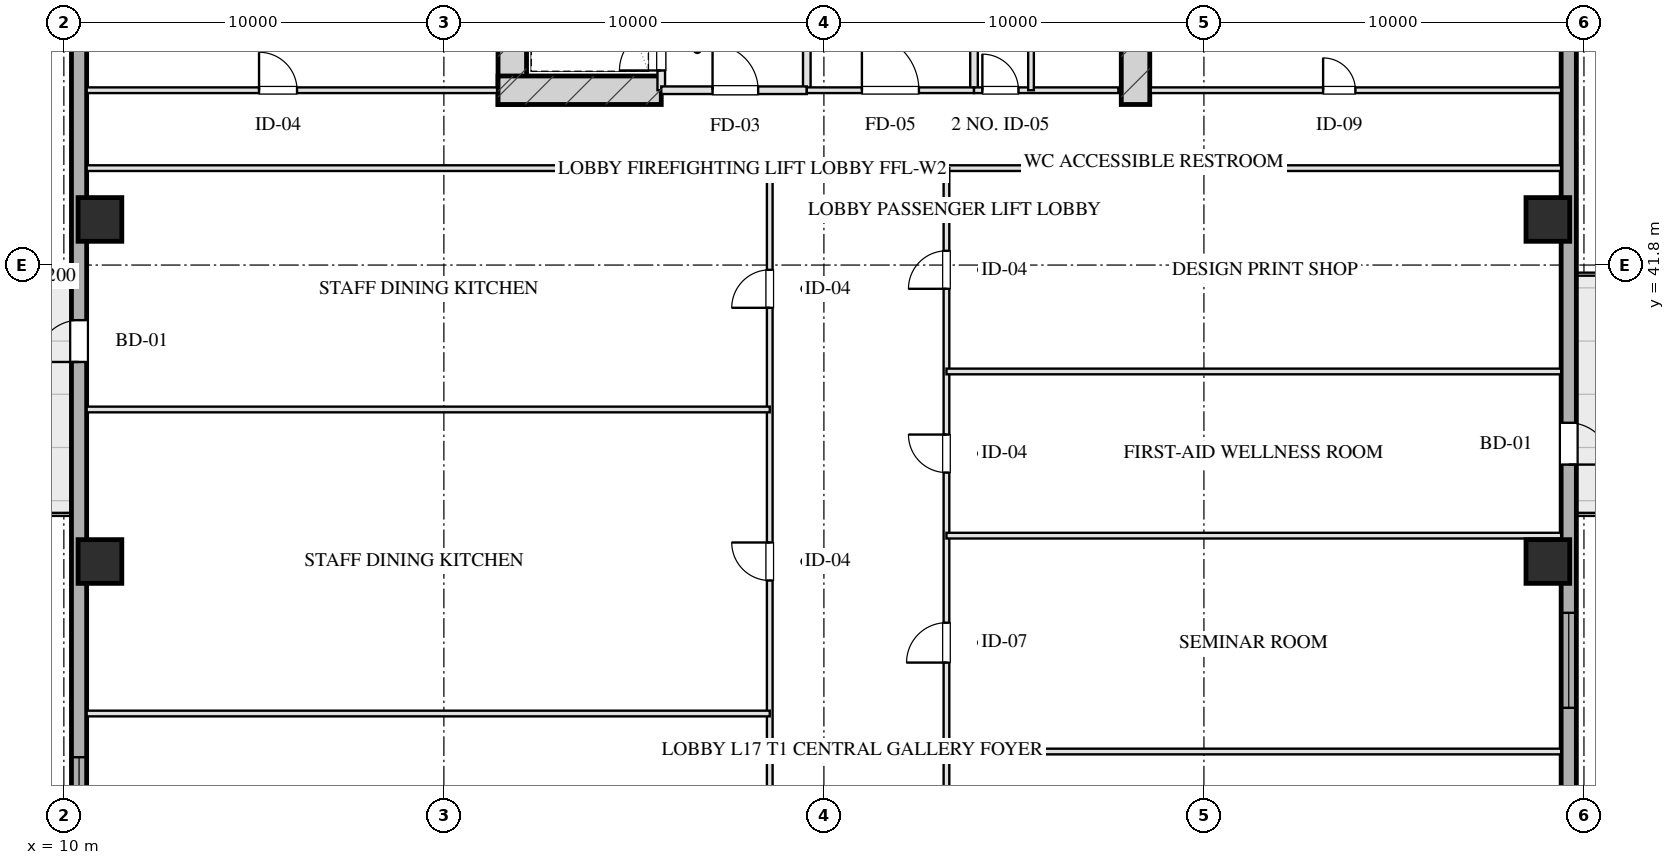
"""IFC4 building model, lengths in metres.
Left out: names, types, materials, properties, quantities, classifications, styles, units other than length and angle.
Written with IfcOpenShell. Run it as: python <this file> out.ifc"""

import sys

from ifc_helpers import new_model, si_unit, direction, frame, frame_2d, origin, origin_2d, place, context, subcontext, project, spatial, rectangle, hollow_rectangle, extrude, element, fill, save


model = new_model("IFC4")
c1 = context("Model", 3, precision=1e-05, world=origin(), true_north=direction((0.0, 1.0)))
c2 = subcontext(c1, "Body", "Model", "MODEL_VIEW")
j1 = project(units=[si_unit("LENGTHUNIT", "METRE"), si_unit("PLANEANGLEUNIT", "RADIAN")], contexts=[c1])
p1 = place(None, origin())
s1 = spatial("IfcSite", under=j1, at=p1, CompositionType="ELEMENT")
p2 = place(p1, origin())
s2 = spatial("IfcBuilding", under=s1, at=p2, CompositionType="ELEMENT")
p3 = place(p2, frame((0.0, 0.0, 71.3)))
s3 = spatial("IfcBuildingStorey", under=s2, at=p3, CompositionType="ELEMENT", Elevation=71.3)
for number, where, z_axis, x_axis in (
    (1, (21.8, 46.025, 0.0), (0.0, 0.0, 1.0), (0.0, 1.0, 0.0)),
    (2, (38.2, 46.025, 0.0), (0.0, 0.0, 1.0), (0.0, 1.0, 0.0)),
):
    element("IfcWall", number, at=place(p3, frame(where, z_axis=z_axis, x_axis=x_axis)), inside=s3, PredefinedType="SHEAR", context=c2, shape_type="SweptSolid", body=[
        extrude(rectangle(XDim=9.63, YDim=0.75, at=frame_2d((4.815, 0.0))), origin(), (0.0, 0.0, 1.0), 3.45),
    ])
p4 = place(p3, frame((21.425, 46.4, 0.0), z_axis=(0.0, 0.0, 1.0), x_axis=(1.0, 0.0, 0.0)))
e3 = element("IfcWall", 3, at=p4, inside=s3, PredefinedType="SHEAR", context=c2, shape_type="SweptSolid", body=[
    extrude(rectangle(XDim=4.295, YDim=0.75, at=frame_2d((2.147, 0.0))), origin(), (0.0, 0.0, 1.0), 3.45),
])
for number, where, z_axis, x_axis in (
    (4, (10.95, 34.0, 0.0), (0.0, 0.0, 1.0), (1.0, 0.0, 0.0)),
    (5, (10.95, 43.0, 0.0), (0.0, 0.0, 1.0), (1.0, 0.0, 0.0)),
    (6, (49.05, 34.0, 0.0), (0.0, 0.0, 1.0), (1.0, 0.0, 0.0)),
    (7, (49.05, 43.0, 0.0), (0.0, 0.0, 1.0), (1.0, 0.0, 0.0)),
):
    element("IfcColumn", number, at=place(p3, frame(where, z_axis=z_axis, x_axis=x_axis)), inside=s3, PredefinedType="COLUMN", context=c2, shape_type="SweptSolid", body=[
        extrude(hollow_rectangle(XDim=1.15, YDim=1.15, WallThickness=0.04, at=origin_2d()), origin(), (0.0, 0.0, 1.0), 3.451),
    ])
p5 = place(p3, frame((10.4, 7.2, 0.0), z_axis=(0.0, 0.0, 1.0), x_axis=(0.0, 1.0, 0.0)))
e8 = element("IfcWall", 8, at=p5, inside=s3, PredefinedType="SOLIDWALL", context=c2, shape_type="SweptSolid", body=[
    extrude(rectangle(XDim=53.6, YDim=0.4, at=frame_2d((26.8, 0.0))), origin(), (0.0, 0.0, 1.0), 2.61),
])
p6 = place(p5, frame((19.15, 0.0, 0.75)))
e9 = element("IfcOpeningElement", 9, at=p6, cuts=e8, PredefinedType="OPENING", context=c2, shape_type="SweptSolid", body=[
    extrude(rectangle(XDim=2.5, YDim=1.46, at=frame_2d((1.25, 0.73))), frame((0.0, 0.21, 0.0), z_axis=(0.0, -1.0, 0.0), x_axis=(1.0, 0.0, 0.0)), (0.0, 0.0, 1.0), 0.42),
])
p7 = place(p5, frame((32.05, 0.0, 0.0)))
e10 = element("IfcOpeningElement", 10, at=p7, cuts=e8, PredefinedType="OPENING", context=c2, shape_type="SweptSolid", body=[
    extrude(rectangle(XDim=1.1, YDim=2.15, at=frame_2d((0.55, 1.075))), frame((0.0, 0.21, 0.0), z_axis=(0.0, -1.0, 0.0), x_axis=(1.0, 0.0, 0.0)), (0.0, 0.0, 1.0), 0.42),
])
p8 = place(p3, frame((49.6, 60.8, 0.0), z_axis=(0.0, 0.0, 1.0), x_axis=(0.0, -1.0, 0.0)))
e11 = element("IfcWall", 11, at=p8, inside=s3, PredefinedType="SOLIDWALL", context=c2, shape_type="SweptSolid", body=[
    extrude(rectangle(XDim=53.6, YDim=0.4, at=frame_2d((26.8, 0.0))), origin(), (0.0, 0.0, 1.0), 2.61),
])
p9 = place(p8, frame((28.15, 0.0, 0.75)))
e12 = element("IfcOpeningElement", 12, at=p9, cuts=e11, PredefinedType="OPENING", context=c2, shape_type="SweptSolid", body=[
    extrude(rectangle(XDim=2.5, YDim=1.46, at=frame_2d((1.25, 0.73))), frame((0.0, 0.21, 0.0), z_axis=(0.0, -1.0, 0.0), x_axis=(1.0, 0.0, 0.0)), (0.0, 0.0, 1.0), 0.42),
])
p10 = place(p8, frame((23.15, 0.0, 0.0)))
e13 = element("IfcOpeningElement", 13, at=p10, cuts=e11, PredefinedType="OPENING", context=c2, shape_type="SweptSolid", body=[
    extrude(rectangle(XDim=1.1, YDim=2.15, at=frame_2d((0.55, 1.075))), frame((0.0, 0.21, 0.0), z_axis=(0.0, -1.0, 0.0), x_axis=(1.0, 0.0, 0.0)), (0.0, 0.0, 1.0), 0.42),
])
p11 = place(p3, frame((25.72, 46.4, 0.0), z_axis=(0.0, 0.0, 1.0), x_axis=(0.0, 1.0, 0.0)))
e14 = element("IfcWall", 14, at=p11, inside=s3, PredefinedType="PARTITIONING", context=c2, shape_type="SweptSolid", body=[
    extrude(rectangle(XDim=1.9, YDim=0.2, at=frame_2d((0.95, 0.0))), origin(), (0.0, 0.0, 1.0), 3.175),
])
p12 = place(p11, frame((0.52, 0.0, 0.0)))
e15 = element("IfcOpeningElement", 15, at=p12, cuts=e14, PredefinedType="OPENING", context=c2, shape_type="SweptSolid", body=[
    extrude(rectangle(XDim=1.1, YDim=2.05, at=frame_2d((0.55, 1.025))), frame((0.0, 0.11, 0.0), z_axis=(0.0, -1.0, 0.0), x_axis=(1.0, 0.0, 0.0)), (0.0, 0.0, 1.0), 0.22),
])
p13 = place(p3, frame((29.55, 46.4, 0.0), z_axis=(0.0, 0.0, 1.0), x_axis=(0.0, 1.0, 0.0)))
e16 = element("IfcWall", 16, at=p13, inside=s3, PredefinedType="PARTITIONING", context=c2, shape_type="SweptSolid", body=[
    extrude(rectangle(XDim=8.43, YDim=0.2, at=frame_2d((4.215, 0.0))), origin(), (0.0, 0.0, 1.0), 3.175),
])
p14 = place(p3, frame((25.72, 46.4, 0.0), z_axis=(0.0, 0.0, 1.0), x_axis=(1.0, 0.0, 0.0)))
e17 = element("IfcWall", 17, at=p14, inside=s3, PredefinedType="PARTITIONING", context=c2, shape_type="SweptSolid", body=[
    extrude(rectangle(XDim=3.83, YDim=0.2, at=frame_2d((1.915, 0.0))), origin(), (0.0, 0.0, 1.0), 3.175),
])
p15 = place(p14, frame((1.35, 0.0, 0.0)))
e18 = element("IfcOpeningElement", 18, at=p15, cuts=e17, PredefinedType="OPENING", context=c2, shape_type="SweptSolid", body=[
    extrude(rectangle(XDim=1.2, YDim=2.05, at=frame_2d((0.6, 1.025))), frame((0.0, 0.11, 0.0), z_axis=(0.0, -1.0, 0.0), x_axis=(1.0, 0.0, 0.0)), (0.0, 0.0, 1.0), 0.22),
])
p16 = place(p3, frame((33.95, 46.4, 0.0), z_axis=(0.0, 0.0, 1.0), x_axis=(0.0, 1.0, 0.0)))
e19 = element("IfcWall", 19, at=p16, inside=s3, PredefinedType="PARTITIONING", context=c2, shape_type="SweptSolid", body=[
    extrude(rectangle(XDim=8.43, YDim=0.2, at=frame_2d((4.215, 0.0))), origin(), (0.0, 0.0, 1.0), 3.175),
])
p17 = place(p3, frame((29.55, 46.4, 0.0), z_axis=(0.0, 0.0, 1.0), x_axis=(1.0, 0.0, 0.0)))
e20 = element("IfcWall", 20, at=p17, inside=s3, PredefinedType="PARTITIONING", context=c2, shape_type="SweptSolid", body=[
    extrude(rectangle(XDim=4.4, YDim=0.15, at=frame_2d((2.2, 0.0))), origin(), (0.0, 0.0, 1.0), 3.175),
])
p18 = place(p17, frame((1.45, 0.0, 0.0)))
e21 = element("IfcOpeningElement", 21, at=p18, cuts=e20, PredefinedType="OPENING", context=c2, shape_type="SweptSolid", body=[
    extrude(rectangle(XDim=1.5, YDim=2.05, at=frame_2d((0.75, 1.025))), frame((0.0, 0.085, 0.0), z_axis=(0.0, -1.0, 0.0), x_axis=(1.0, 0.0, 0.0)), (0.0, 0.0, 1.0), 0.17),
])
p19 = place(p3, frame((33.95, 46.4, 0.0), z_axis=(0.0, 0.0, 1.0), x_axis=(1.0, 0.0, 0.0)))
e22 = element("IfcWall", 22, at=p19, inside=s3, PredefinedType="PARTITIONING", context=c2, shape_type="SweptSolid", body=[
    extrude(rectangle(XDim=3.8, YDim=0.15, at=frame_2d((1.9, 0.0))), origin(), (0.0, 0.0, 1.0), 3.175),
])
p20 = place(p19, frame((0.22, 0.0, 0.0)))
e23 = element("IfcOpeningElement", 23, at=p20, cuts=e22, PredefinedType="OPENING", context=c2, shape_type="SweptSolid", body=[
    extrude(rectangle(XDim=0.95, YDim=2.05, at=frame_2d((0.475, 1.025))), frame((0.0, 0.085, 0.0), z_axis=(0.0, -1.0, 0.0), x_axis=(1.0, 0.0, 0.0)), (0.0, 0.0, 1.0), 0.17),
])
p21 = place(p3, frame((35.45, 46.4, 0.0), z_axis=(0.0, 0.0, 1.0), x_axis=(0.0, 1.0, 0.0)))
e24 = element("IfcWall", 24, at=p21, inside=s3, PredefinedType="PARTITIONING", context=c2, shape_type="SweptSolid", body=[
    extrude(rectangle(XDim=8.43, YDim=0.15, at=frame_2d((4.215, 0.0))), origin(), (0.0, 0.0, 1.0), 2.815),
])
p22 = place(p21, frame((2.55, 0.0, 0.0)))
e25 = element("IfcOpeningElement", 25, at=p22, cuts=e24, PredefinedType="OPENING", context=c2, shape_type="SweptSolid", body=[
    extrude(rectangle(XDim=0.95, YDim=2.05, at=frame_2d((0.475, 1.025))), frame((0.0, 0.085, 0.0), z_axis=(0.0, -1.0, 0.0), x_axis=(1.0, 0.0, 0.0)), (0.0, 0.0, 1.0), 0.17),
])
p23 = place(p21, frame((5.8, 0.0, 0.0)))
e26 = element("IfcOpeningElement", 26, at=p23, cuts=e24, PredefinedType="OPENING", context=c2, shape_type="SweptSolid", body=[
    extrude(rectangle(XDim=0.9, YDim=2.05, at=frame_2d((0.45, 1.025))), frame((0.0, 0.085, 0.0), z_axis=(0.0, -1.0, 0.0), x_axis=(1.0, 0.0, 0.0)), (0.0, 0.0, 1.0), 0.17),
])
p24 = place(p3, frame((10.6, 46.4, 0.0), z_axis=(0.0, 0.0, 1.0), x_axis=(1.0, 0.0, 0.0)))
e27 = element("IfcWall", 27, at=p24, inside=s3, PredefinedType="PARTITIONING", context=c2, shape_type="SweptSolid", body=[
    extrude(rectangle(XDim=10.8, YDim=0.15, at=frame_2d((5.4, 0.0))), origin(), (0.0, 0.0, 1.0), 3.175),
])
p25 = place(p24, frame((4.536, 0.0, 0.0)))
e28 = element("IfcOpeningElement", 28, at=p25, cuts=e27, PredefinedType="OPENING", context=c2, shape_type="SweptSolid", body=[
    extrude(rectangle(XDim=1.0, YDim=2.05, at=frame_2d((0.5, 1.025))), frame((0.0, 0.085, 0.0), z_axis=(0.0, -1.0, 0.0), x_axis=(1.0, 0.0, 0.0)), (0.0, 0.0, 1.0), 0.17),
])
p26 = place(p3, frame((38.6, 46.4, 0.0), z_axis=(0.0, 0.0, 1.0), x_axis=(1.0, 0.0, 0.0)))
e29 = element("IfcWall", 29, at=p26, inside=s3, PredefinedType="PARTITIONING", context=c2, shape_type="SweptSolid", body=[
    extrude(rectangle(XDim=10.8, YDim=0.15, at=frame_2d((5.4, 0.0))), origin(), (0.0, 0.0, 1.0), 3.175),
])
p27 = place(p26, frame((4.536, 0.0, 0.0)))
e30 = element("IfcOpeningElement", 30, at=p27, cuts=e29, PredefinedType="OPENING", context=c2, shape_type="SweptSolid", body=[
    extrude(rectangle(XDim=0.85, YDim=2.05, at=frame_2d((0.425, 1.025))), frame((0.0, 0.085, 0.0), z_axis=(0.0, -1.0, 0.0), x_axis=(1.0, 0.0, 0.0)), (0.0, 0.0, 1.0), 0.17),
])
p28 = place(p3, frame((10.6, 44.35, 0.0), z_axis=(0.0, 0.0, 1.0), x_axis=(1.0, 0.0, 0.0)))
e31 = element("IfcWall", 31, at=p28, inside=s3, PredefinedType="PARTITIONING", context=c2, shape_type="SweptSolid", body=[
    extrude(rectangle(XDim=17.975, YDim=0.15, at=frame_2d((8.987, 0.0))), origin(), (0.0, 0.0, 1.0), 3.175),
])
p29 = place(p3, frame((33.225, 44.35, 0.0), z_axis=(0.0, 0.0, 1.0), x_axis=(1.0, 0.0, 0.0)))
e32 = element("IfcWall", 32, at=p29, inside=s3, PredefinedType="PARTITIONING", context=c2, shape_type="SweptSolid", body=[
    extrude(rectangle(XDim=16.175, YDim=0.15, at=frame_2d((8.087, 0.0))), origin(), (0.0, 0.0, 1.0), 3.175),
])
p30 = place(p3, frame((28.575, 23.65, 0.0), z_axis=(0.0, 0.0, 1.0), x_axis=(0.0, 1.0, 0.0)))
e33 = element("IfcWall", 33, at=p30, inside=s3, PredefinedType="PARTITIONING", context=c2, shape_type="SweptSolid", body=[
    extrude(rectangle(XDim=20.7, YDim=0.15, at=frame_2d((10.35, 0.0))), origin(), (0.0, 0.0, 1.0), 3.175),
])
p31 = place(p30, frame((2.675, 0.0, 0.0)))
e34 = element("IfcOpeningElement", 34, at=p31, cuts=e33, PredefinedType="OPENING", context=c2, shape_type="SweptSolid", body=[
    extrude(rectangle(XDim=1.0, YDim=2.05, at=frame_2d((0.5, 1.025))), frame((0.0, 0.085, 0.0), z_axis=(0.0, -1.0, 0.0), x_axis=(1.0, 0.0, 0.0)), (0.0, 0.0, 1.0), 0.17),
])
p32 = place(p30, frame((9.85, 0.0, 0.0)))
e35 = element("IfcOpeningElement", 35, at=p32, cuts=e33, PredefinedType="OPENING", context=c2, shape_type="SweptSolid", body=[
    extrude(rectangle(XDim=1.0, YDim=2.05, at=frame_2d((0.5, 1.025))), frame((0.0, 0.085, 0.0), z_axis=(0.0, -1.0, 0.0), x_axis=(1.0, 0.0, 0.0)), (0.0, 0.0, 1.0), 0.17),
])
p33 = place(p30, frame((17.025, 0.0, 0.0)))
e36 = element("IfcOpeningElement", 36, at=p33, cuts=e33, PredefinedType="OPENING", context=c2, shape_type="SweptSolid", body=[
    extrude(rectangle(XDim=1.0, YDim=2.05, at=frame_2d((0.5, 1.025))), frame((0.0, 0.085, 0.0), z_axis=(0.0, -1.0, 0.0), x_axis=(1.0, 0.0, 0.0)), (0.0, 0.0, 1.0), 0.17),
])
p34 = place(p3, frame((33.225, 23.65, 0.0), z_axis=(0.0, 0.0, 1.0), x_axis=(0.0, 1.0, 0.0)))
e37 = element("IfcWall", 37, at=p34, inside=s3, PredefinedType="PARTITIONING", context=c2, shape_type="SweptSolid", body=[
    extrude(rectangle(XDim=20.7, YDim=0.15, at=frame_2d((10.35, 0.0))), origin(), (0.0, 0.0, 1.0), 3.175),
])
p35 = place(p34, frame((2.175, 0.0, 0.0)))
e38 = element("IfcOpeningElement", 38, at=p35, cuts=e37, PredefinedType="OPENING", context=c2, shape_type="SweptSolid", body=[
    extrude(rectangle(XDim=1.0, YDim=2.05, at=frame_2d((0.5, 1.025))), frame((0.0, 0.085, 0.0), z_axis=(0.0, -1.0, 0.0), x_axis=(1.0, 0.0, 0.0)), (0.0, 0.0, 1.0), 0.17),
])
p36 = place(p34, frame((7.69, 0.0, 0.0)))
e39 = element("IfcOpeningElement", 39, at=p36, cuts=e37, PredefinedType="OPENING", context=c2, shape_type="SweptSolid", body=[
    extrude(rectangle(XDim=1.05, YDim=2.05, at=frame_2d((0.525, 1.025))), frame((0.0, 0.085, 0.0), z_axis=(0.0, -1.0, 0.0), x_axis=(1.0, 0.0, 0.0)), (0.0, 0.0, 1.0), 0.17),
])
p37 = place(p34, frame((12.69, 0.0, 0.0)))
e40 = element("IfcOpeningElement", 40, at=p37, cuts=e37, PredefinedType="OPENING", context=c2, shape_type="SweptSolid", body=[
    extrude(rectangle(XDim=1.0, YDim=2.05, at=frame_2d((0.5, 1.025))), frame((0.0, 0.085, 0.0), z_axis=(0.0, -1.0, 0.0), x_axis=(1.0, 0.0, 0.0)), (0.0, 0.0, 1.0), 0.17),
])
p38 = place(p34, frame((17.525, 0.0, 0.0)))
e41 = element("IfcOpeningElement", 41, at=p38, cuts=e37, PredefinedType="OPENING", context=c2, shape_type="SweptSolid", body=[
    extrude(rectangle(XDim=1.0, YDim=2.05, at=frame_2d((0.5, 1.025))), frame((0.0, 0.085, 0.0), z_axis=(0.0, -1.0, 0.0), x_axis=(1.0, 0.0, 0.0)), (0.0, 0.0, 1.0), 0.17),
])
for number, where, z_axis, x_axis in (
    (42, (10.6, 30.0, 0.0), (0.0, 0.0, 1.0), (1.0, 0.0, 0.0)),
    (43, (10.6, 38.0, 0.0), (0.0, 0.0, 1.0), (1.0, 0.0, 0.0)),
):
    element("IfcWall", number, at=place(p3, frame(where, z_axis=z_axis, x_axis=x_axis)), inside=s3, PredefinedType="PARTITIONING", context=c2, shape_type="SweptSolid", body=[
        extrude(rectangle(XDim=17.975, YDim=0.15, at=frame_2d((8.987, 0.0))), origin(), (0.0, 0.0, 1.0), 3.175),
    ])
for number, where, z_axis, x_axis in (
    (44, (33.225, 29.0, 0.0), (0.0, 0.0, 1.0), (1.0, 0.0, 0.0)),
    (45, (33.225, 34.68, 0.0), (0.0, 0.0, 1.0), (1.0, 0.0, 0.0)),
    (46, (33.225, 39.0, 0.0), (0.0, 0.0, 1.0), (1.0, 0.0, 0.0)),
):
    element("IfcWall", number, at=place(p3, frame(where, z_axis=z_axis, x_axis=x_axis)), inside=s3, PredefinedType="PARTITIONING", context=c2, shape_type="SweptSolid", body=[
        extrude(rectangle(XDim=16.175, YDim=0.15, at=frame_2d((8.087, 0.0))), origin(), (0.0, 0.0, 1.0), 3.175),
    ])
p39 = place(p6, origin())
e47 = element("IfcWindow", 47, at=p39, inside=s3, PartitioningType="TRIPLE_PANEL_VERTICAL", PredefinedType="WINDOW", context=c2, shape_type="SweptSolid", body=[
    extrude(rectangle(XDim=2.5, YDim=1.46, at=frame_2d((1.25, 0.73))), frame((0.0, 0.03, 0.0), z_axis=(0.0, -1.0, 0.0), x_axis=(1.0, 0.0, 0.0)), (0.0, 0.0, 1.0), 0.06),
])
fill(e9, e47)
p40 = place(p9, origin())
e48 = element("IfcWindow", 48, at=p40, inside=s3, PartitioningType="TRIPLE_PANEL_VERTICAL", PredefinedType="WINDOW", context=c2, shape_type="SweptSolid", body=[
    extrude(rectangle(XDim=2.5, YDim=1.46, at=frame_2d((1.25, 0.73))), frame((0.0, 0.03, 0.0), z_axis=(0.0, -1.0, 0.0), x_axis=(1.0, 0.0, 0.0)), (0.0, 0.0, 1.0), 0.06),
])
fill(e12, e48)
p41 = place(p7, origin())
e49 = element("IfcDoor", 49, at=p41, inside=s3, OperationType="SINGLE_SWING_LEFT", PredefinedType="DOOR", context=c2, shape_type="SweptSolid", body=[
    extrude(rectangle(XDim=1.1, YDim=2.15, at=frame_2d((0.55, 1.075))), frame((0.0, 0.025, 0.0), z_axis=(0.0, -1.0, 0.0), x_axis=(1.0, 0.0, 0.0)), (0.0, 0.0, 1.0), 0.05),
])
fill(e10, e49)
p42 = place(p10, origin())
e50 = element("IfcDoor", 50, at=p42, inside=s3, OperationType="SINGLE_SWING_RIGHT", PredefinedType="DOOR", context=c2, shape_type="SweptSolid", body=[
    extrude(rectangle(XDim=1.1, YDim=2.15, at=frame_2d((0.55, 1.075))), frame((0.0, 0.025, 0.0), z_axis=(0.0, -1.0, 0.0), x_axis=(1.0, 0.0, 0.0)), (0.0, 0.0, 1.0), 0.05),
])
fill(e13, e50)
p43 = place(p12, origin())
e51 = element("IfcDoor", 51, at=p43, inside=s3, OperationType="SINGLE_SWING_LEFT", PredefinedType="DOOR", context=c2, shape_type="SweptSolid", body=[
    extrude(rectangle(XDim=1.1, YDim=2.05, at=frame_2d((0.55, 1.025))), frame((0.0, 0.025, 0.0), z_axis=(0.0, -1.0, 0.0), x_axis=(1.0, 0.0, 0.0)), (0.0, 0.0, 1.0), 0.05),
])
fill(e15, e51)
p44 = place(p15, origin())
e52 = element("IfcDoor", 52, at=p44, inside=s3, OperationType="SINGLE_SWING_LEFT", PredefinedType="DOOR", context=c2, shape_type="SweptSolid", body=[
    extrude(rectangle(XDim=1.2, YDim=2.05, at=frame_2d((0.6, 1.025))), frame((0.0, 0.025, 0.0), z_axis=(0.0, -1.0, 0.0), x_axis=(1.0, 0.0, 0.0)), (0.0, 0.0, 1.0), 0.05),
])
fill(e18, e52)
p45 = place(p18, origin())
e53 = element("IfcDoor", 53, at=p45, inside=s3, OperationType="SINGLE_SWING_LEFT", PredefinedType="DOOR", context=c2, shape_type="SweptSolid", body=[
    extrude(rectangle(XDim=1.5, YDim=2.05, at=frame_2d((0.75, 1.025))), frame((0.0, 0.025, 0.0), z_axis=(0.0, -1.0, 0.0), x_axis=(1.0, 0.0, 0.0)), (0.0, 0.0, 1.0), 0.05),
])
fill(e21, e53)
p46 = place(p20, origin())
e54 = element("IfcDoor", 54, at=p46, inside=s3, OperationType="SINGLE_SWING_LEFT", PredefinedType="DOOR", context=c2, shape_type="SweptSolid", body=[
    extrude(rectangle(XDim=0.95, YDim=2.05, at=frame_2d((0.475, 1.025))), frame((0.0, 0.025, 0.0), z_axis=(0.0, -1.0, 0.0), x_axis=(1.0, 0.0, 0.0)), (0.0, 0.0, 1.0), 0.05),
])
fill(e23, e54)
p47 = place(p25, origin())
e55 = element("IfcDoor", 55, at=p47, inside=s3, OperationType="SINGLE_SWING_LEFT", PredefinedType="DOOR", context=c2, shape_type="SweptSolid", body=[
    extrude(rectangle(XDim=1.0, YDim=2.05, at=frame_2d((0.5, 1.025))), frame((0.0, 0.025, 0.0), z_axis=(0.0, -1.0, 0.0), x_axis=(1.0, 0.0, 0.0)), (0.0, 0.0, 1.0), 0.05),
])
fill(e28, e55)
p48 = place(p27, origin())
e56 = element("IfcDoor", 56, at=p48, inside=s3, OperationType="SINGLE_SWING_LEFT", PredefinedType="DOOR", context=c2, shape_type="SweptSolid", body=[
    extrude(rectangle(XDim=0.85, YDim=2.05, at=frame_2d((0.425, 1.025))), frame((0.0, 0.025, 0.0), z_axis=(0.0, -1.0, 0.0), x_axis=(1.0, 0.0, 0.0)), (0.0, 0.0, 1.0), 0.05),
])
fill(e30, e56)
p49 = place(p32, origin())
e57 = element("IfcDoor", 57, at=p49, inside=s3, OperationType="SINGLE_SWING_RIGHT", PredefinedType="DOOR", context=c2, shape_type="SweptSolid", body=[
    extrude(rectangle(XDim=1.0, YDim=2.05, at=frame_2d((0.5, 1.025))), frame((0.0, 0.025, 0.0), z_axis=(0.0, -1.0, 0.0), x_axis=(1.0, 0.0, 0.0)), (0.0, 0.0, 1.0), 0.05),
])
fill(e35, e57)
p50 = place(p33, origin())
e58 = element("IfcDoor", 58, at=p50, inside=s3, OperationType="SINGLE_SWING_LEFT", PredefinedType="DOOR", context=c2, shape_type="SweptSolid", body=[
    extrude(rectangle(XDim=1.0, YDim=2.05, at=frame_2d((0.5, 1.025))), frame((0.0, 0.025, 0.0), z_axis=(0.0, -1.0, 0.0), x_axis=(1.0, 0.0, 0.0)), (0.0, 0.0, 1.0), 0.05),
])
fill(e36, e58)
p51 = place(p36, origin())
e59 = element("IfcDoor", 59, at=p51, inside=s3, OperationType="SINGLE_SWING_LEFT", PredefinedType="DOOR", context=c2, shape_type="SweptSolid", body=[
    extrude(rectangle(XDim=1.05, YDim=2.05, at=frame_2d((0.525, 1.025))), frame((0.0, 0.025, 0.0), z_axis=(0.0, -1.0, 0.0), x_axis=(1.0, 0.0, 0.0)), (0.0, 0.0, 1.0), 0.05),
])
fill(e39, e59)
p52 = place(p37, origin())
e60 = element("IfcDoor", 60, at=p52, inside=s3, OperationType="SINGLE_SWING_RIGHT", PredefinedType="DOOR", context=c2, shape_type="SweptSolid", body=[
    extrude(rectangle(XDim=1.0, YDim=2.05, at=frame_2d((0.5, 1.025))), frame((0.0, 0.025, 0.0), z_axis=(0.0, -1.0, 0.0), x_axis=(1.0, 0.0, 0.0)), (0.0, 0.0, 1.0), 0.05),
])
fill(e40, e60)
p53 = place(p38, origin())
e61 = element("IfcDoor", 61, at=p53, inside=s3, OperationType="SINGLE_SWING_LEFT", PredefinedType="DOOR", context=c2, shape_type="SweptSolid", body=[
    extrude(rectangle(XDim=1.0, YDim=2.05, at=frame_2d((0.5, 1.025))), frame((0.0, 0.025, 0.0), z_axis=(0.0, -1.0, 0.0), x_axis=(1.0, 0.0, 0.0)), (0.0, 0.0, 1.0), 0.05),
])
fill(e41, e61)
save(model, sys.argv[1])
